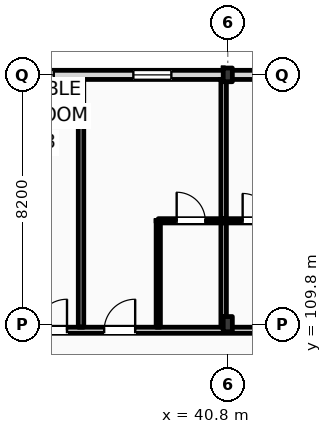
"""IFC4 building model, lengths in metres.
Left out: names, types, materials, properties, quantities, classifications, styles, units other than length and angle.
Written with IfcOpenShell. Run it as: python <this file> out.ifc"""

import sys

from ifc_helpers import new_model, si_unit, direction, frame, frame_2d, origin, origin_2d, place, context, subcontext, project, spatial, rectangle, i_section, extrude, element, fill, save


model = new_model("IFC4")
c1 = context("Model", 3, precision=1e-05, world=origin(), true_north=direction((0.0, 1.0)))
c2 = subcontext(c1, "Body", "Model", "MODEL_VIEW")
j1 = project(units=[si_unit("LENGTHUNIT", "METRE"), si_unit("PLANEANGLEUNIT", "RADIAN")], contexts=[c1])
p1 = place(None, origin())
s1 = spatial("IfcSite", under=j1, at=p1, CompositionType="ELEMENT")
p2 = place(p1, origin())
s2 = spatial("IfcBuilding", under=s1, at=p2, CompositionType="ELEMENT")
p3 = place(p2, frame((0.0, 0.0, 28.2)))
s3 = spatial("IfcBuildingStorey", under=s2, at=p3, CompositionType="ELEMENT", Elevation=28.2)
p4 = place(p3, frame((40.8, 109.8, 0.0), z_axis=(0.0, 0.0, 1.0), x_axis=(1.0, 0.0, 0.0)))
e1 = element("IfcColumn", 1, at=p4, inside=s3, PredefinedType="COLUMN", context=c2, shape_type="SweptSolid", body=[
    extrude(i_section(OverallWidth=0.3, OverallDepth=0.5, WebThickness=0.014, FlangeThickness=0.028, FilletRadius=0.027, at=origin_2d()), origin(), (0.0, 0.0, 1.0), 3.6),
])
p5 = place(p3, frame((40.8, 118.0, 0.0), z_axis=(0.0, 0.0, 1.0), x_axis=(1.0, 0.0, 0.0)))
e2 = element("IfcColumn", 2, at=p5, inside=s3, PredefinedType="COLUMN", context=c2, shape_type="SweptSolid", body=[
    extrude(i_section(OverallWidth=0.3, OverallDepth=0.45, WebThickness=0.014, FlangeThickness=0.026, FilletRadius=0.027, at=origin_2d()), origin(), (0.0, 0.0, 1.0), 3.6),
])
p6 = place(p3, frame((22.5, 118.0, 0.0), z_axis=(0.0, 0.0, 1.0), x_axis=(1.0, 0.0, 0.0)))
e3 = element("IfcWall", 3, at=p6, inside=s3, PredefinedType="STANDARD", context=c2, shape_type="SweptSolid", body=[
    extrude(rectangle(XDim=97.5, YDim=0.3, at=frame_2d((48.75, 0.0))), origin(), (0.0, 0.0, 1.0), 2.8),
])
p7 = place(p6, frame((0.91, 0.0, 0.9)))
e4 = element("IfcOpeningElement", 4, at=p7, cuts=e3, PredefinedType="OPENING", context=c2, shape_type="SweptSolid", body=[
    extrude(rectangle(XDim=0.9, YDim=1.72, at=frame_2d((0.45, 0.86))), frame((0.0, 0.16, 0.0), z_axis=(0.0, -1.0, 0.0), x_axis=(1.0, 0.0, 0.0)), (0.0, 0.0, 1.0), 0.32),
])
p8 = place(p6, frame((6.561, 0.0, 0.0)))
e5 = element("IfcOpeningElement", 5, at=p8, cuts=e3, PredefinedType="OPENING", context=c2, shape_type="SweptSolid", body=[
    extrude(rectangle(XDim=1.2, YDim=2.25, at=frame_2d((0.6, 1.125))), frame((0.0, 0.16, 0.0), z_axis=(0.0, -1.0, 0.0), x_axis=(1.0, 0.0, 0.0)), (0.0, 0.0, 1.0), 0.32),
])
p9 = place(p6, frame((11.477, 0.0, 0.9)))
e6 = element("IfcOpeningElement", 6, at=p9, cuts=e3, PredefinedType="OPENING", context=c2, shape_type="SweptSolid", body=[
    extrude(rectangle(XDim=1.1, YDim=1.5, at=frame_2d((0.55, 0.75))), frame((0.0, 0.16, 0.0), z_axis=(0.0, -1.0, 0.0), x_axis=(1.0, 0.0, 0.0)), (0.0, 0.0, 1.0), 0.32),
])
p10 = place(p6, frame((15.194, 0.0, 0.9)))
e7 = element("IfcOpeningElement", 7, at=p10, cuts=e3, PredefinedType="OPENING", context=c2, shape_type="SweptSolid", body=[
    extrude(rectangle(XDim=1.25, YDim=1.6, at=frame_2d((0.625, 0.8))), frame((0.0, 0.16, 0.0), z_axis=(0.0, -1.0, 0.0), x_axis=(1.0, 0.0, 0.0)), (0.0, 0.0, 1.0), 0.32),
])
p11 = place(p6, frame((19.509, 0.0, 0.9)))
e8 = element("IfcOpeningElement", 8, at=p11, cuts=e3, PredefinedType="OPENING", context=c2, shape_type="SweptSolid", body=[
    extrude(rectangle(XDim=1.4, YDim=1.7, at=frame_2d((0.7, 0.85))), frame((0.0, 0.16, 0.0), z_axis=(0.0, -1.0, 0.0), x_axis=(1.0, 0.0, 0.0)), (0.0, 0.0, 1.0), 0.32),
])
p12 = place(p6, frame((23.258, 0.0, 0.0)))
e9 = element("IfcOpeningElement", 9, at=p12, cuts=e3, PredefinedType="OPENING", context=c2, shape_type="SweptSolid", body=[
    extrude(rectangle(XDim=1.2, YDim=2.25, at=frame_2d((0.6, 1.125))), frame((0.0, 0.16, 0.0), z_axis=(0.0, -1.0, 0.0), x_axis=(1.0, 0.0, 0.0)), (0.0, 0.0, 1.0), 0.32),
])
p13 = place(p6, frame((28.115, 0.0, 0.9)))
e10 = element("IfcOpeningElement", 10, at=p13, cuts=e3, PredefinedType="OPENING", context=c2, shape_type="SweptSolid", body=[
    extrude(rectangle(XDim=1.75, YDim=1.72, at=frame_2d((0.875, 0.86))), frame((0.0, 0.16, 0.0), z_axis=(0.0, -1.0, 0.0), x_axis=(1.0, 0.0, 0.0)), (0.0, 0.0, 1.0), 0.32),
])
p14 = place(p6, frame((31.582, 0.0, 0.9)))
e11 = element("IfcOpeningElement", 11, at=p14, cuts=e3, PredefinedType="OPENING", context=c2, shape_type="SweptSolid", body=[
    extrude(rectangle(XDim=1.35, YDim=1.72, at=frame_2d((0.675, 0.86))), frame((0.0, 0.16, 0.0), z_axis=(0.0, -1.0, 0.0), x_axis=(1.0, 0.0, 0.0)), (0.0, 0.0, 1.0), 0.32),
])
p15 = place(p6, frame((37.379, 0.0, 0.0)))
e12 = element("IfcOpeningElement", 12, at=p15, cuts=e3, PredefinedType="OPENING", context=c2, shape_type="SweptSolid", body=[
    extrude(rectangle(XDim=1.2, YDim=2.25, at=frame_2d((0.6, 1.125))), frame((0.0, 0.16, 0.0), z_axis=(0.0, -1.0, 0.0), x_axis=(1.0, 0.0, 0.0)), (0.0, 0.0, 1.0), 0.32),
])
p16 = place(p6, frame((42.663, 0.0, 0.9)))
e13 = element("IfcOpeningElement", 13, at=p16, cuts=e3, PredefinedType="OPENING", context=c2, shape_type="SweptSolid", body=[
    extrude(rectangle(XDim=1.35, YDim=1.72, at=frame_2d((0.675, 0.86))), frame((0.0, 0.16, 0.0), z_axis=(0.0, -1.0, 0.0), x_axis=(1.0, 0.0, 0.0)), (0.0, 0.0, 1.0), 0.32),
])
p17 = place(p6, frame((45.119, 0.0, 0.9)))
e14 = element("IfcOpeningElement", 14, at=p17, cuts=e3, PredefinedType="OPENING", context=c2, shape_type="SweptSolid", body=[
    extrude(rectangle(XDim=2.871, YDim=1.72, at=frame_2d((1.436, 0.86))), frame((0.0, 0.16, 0.0), z_axis=(0.0, -1.0, 0.0), x_axis=(1.0, 0.0, 0.0)), (0.0, 0.0, 1.0), 0.32),
])
p18 = place(p6, frame((50.41, 0.0, 0.9)))
e15 = element("IfcOpeningElement", 15, at=p18, cuts=e3, PredefinedType="OPENING", context=c2, shape_type="SweptSolid", body=[
    extrude(rectangle(XDim=1.8, YDim=1.72, at=frame_2d((0.9, 0.86))), frame((0.0, 0.16, 0.0), z_axis=(0.0, -1.0, 0.0), x_axis=(1.0, 0.0, 0.0)), (0.0, 0.0, 1.0), 0.32),
])
p19 = place(p6, frame((54.375, 0.0, 0.0)))
e16 = element("IfcOpeningElement", 16, at=p19, cuts=e3, PredefinedType="OPENING", context=c2, shape_type="SweptSolid", body=[
    extrude(rectangle(XDim=1.2, YDim=2.25, at=frame_2d((0.6, 1.125))), frame((0.0, 0.16, 0.0), z_axis=(0.0, -1.0, 0.0), x_axis=(1.0, 0.0, 0.0)), (0.0, 0.0, 1.0), 0.32),
])
p20 = place(p6, frame((59.052, 0.0, 0.9)))
e17 = element("IfcOpeningElement", 17, at=p20, cuts=e3, PredefinedType="OPENING", context=c2, shape_type="SweptSolid", body=[
    extrude(rectangle(XDim=1.35, YDim=1.72, at=frame_2d((0.675, 0.86))), frame((0.0, 0.16, 0.0), z_axis=(0.0, -1.0, 0.0), x_axis=(1.0, 0.0, 0.0)), (0.0, 0.0, 1.0), 0.32),
])
p21 = place(p6, frame((62.768, 0.0, 0.9)))
e18 = element("IfcOpeningElement", 18, at=p21, cuts=e3, PredefinedType="OPENING", context=c2, shape_type="SweptSolid", body=[
    extrude(rectangle(XDim=1.5, YDim=1.72, at=frame_2d((0.75, 0.86))), frame((0.0, 0.16, 0.0), z_axis=(0.0, -1.0, 0.0), x_axis=(1.0, 0.0, 0.0)), (0.0, 0.0, 1.0), 0.32),
])
p22 = place(p6, frame((68.498, 0.0, 0.0)))
e19 = element("IfcOpeningElement", 19, at=p22, cuts=e3, PredefinedType="OPENING", context=c2, shape_type="SweptSolid", body=[
    extrude(rectangle(XDim=1.2, YDim=2.25, at=frame_2d((0.6, 1.125))), frame((0.0, 0.16, 0.0), z_axis=(0.0, -1.0, 0.0), x_axis=(1.0, 0.0, 0.0)), (0.0, 0.0, 1.0), 0.32),
])
p23 = place(p6, frame((71.265, 0.0, 0.9)))
e20 = element("IfcOpeningElement", 20, at=p23, cuts=e3, PredefinedType="OPENING", context=c2, shape_type="SweptSolid", body=[
    extrude(rectangle(XDim=0.9, YDim=1.72, at=frame_2d((0.45, 0.86))), frame((0.0, 0.16, 0.0), z_axis=(0.0, -1.0, 0.0), x_axis=(1.0, 0.0, 0.0)), (0.0, 0.0, 1.0), 0.32),
])
p24 = place(p6, frame((76.316, 0.0, 0.9)))
e21 = element("IfcOpeningElement", 21, at=p24, cuts=e3, PredefinedType="OPENING", context=c2, shape_type="SweptSolid", body=[
    extrude(rectangle(XDim=1.95, YDim=1.72, at=frame_2d((0.975, 0.86))), frame((0.0, 0.16, 0.0), z_axis=(0.0, -1.0, 0.0), x_axis=(1.0, 0.0, 0.0)), (0.0, 0.0, 1.0), 0.32),
])
p25 = place(p6, frame((81.632, 0.0, 0.9)))
e22 = element("IfcOpeningElement", 22, at=p25, cuts=e3, PredefinedType="OPENING", context=c2, shape_type="SweptSolid", body=[
    extrude(rectangle(XDim=1.35, YDim=1.72, at=frame_2d((0.675, 0.86))), frame((0.0, 0.16, 0.0), z_axis=(0.0, -1.0, 0.0), x_axis=(1.0, 0.0, 0.0)), (0.0, 0.0, 1.0), 0.32),
])
p26 = place(p6, frame((84.948, 0.0, 0.9)))
e23 = element("IfcOpeningElement", 23, at=p26, cuts=e3, PredefinedType="OPENING", context=c2, shape_type="SweptSolid", body=[
    extrude(rectangle(XDim=2.25, YDim=1.72, at=frame_2d((1.125, 0.86))), frame((0.0, 0.16, 0.0), z_axis=(0.0, -1.0, 0.0), x_axis=(1.0, 0.0, 0.0)), (0.0, 0.0, 1.0), 0.32),
])
p27 = place(p6, frame((90.063, 0.0, 0.9)))
e24 = element("IfcOpeningElement", 24, at=p27, cuts=e3, PredefinedType="OPENING", context=c2, shape_type="SweptSolid", body=[
    extrude(rectangle(XDim=1.8, YDim=1.72, at=frame_2d((0.9, 0.86))), frame((0.0, 0.16, 0.0), z_axis=(0.0, -1.0, 0.0), x_axis=(1.0, 0.0, 0.0)), (0.0, 0.0, 1.0), 0.32),
])
p28 = place(p6, frame((93.529, 0.0, 0.9)))
e25 = element("IfcOpeningElement", 25, at=p28, cuts=e3, PredefinedType="OPENING", context=c2, shape_type="SweptSolid", body=[
    extrude(rectangle(XDim=2.55, YDim=1.72, at=frame_2d((1.275, 0.86))), frame((0.0, 0.16, 0.0), z_axis=(0.0, -1.0, 0.0), x_axis=(1.0, 0.0, 0.0)), (0.0, 0.0, 1.0), 0.32),
])
p29 = place(p3, frame((10.65, 109.6, 0.0), z_axis=(0.0, 0.0, 1.0), x_axis=(1.0, 0.0, 0.0)))
e26 = element("IfcWall", 26, at=p29, inside=s3, PredefinedType="PARTITIONING", context=c2, shape_type="SweptSolid", body=[
    extrude(rectangle(XDim=109.21, YDim=0.2, at=frame_2d((54.605, 0.0))), origin(), (0.0, 0.0, 1.0), 2.8),
])
p30 = place(p29, frame((12.611, 0.0, 0.0)))
e27 = element("IfcOpeningElement", 27, at=p30, cuts=e26, PredefinedType="OPENING", context=c2, shape_type="SweptSolid", body=[
    extrude(rectangle(XDim=1.02, YDim=2.2, at=frame_2d((0.51, 1.1))), frame((0.0, 0.11, 0.0), z_axis=(0.0, -1.0, 0.0), x_axis=(1.0, 0.0, 0.0)), (0.0, 0.0, 1.0), 0.22),
])
p31 = place(p29, frame((19.451, 0.0, 0.0)))
e28 = element("IfcOpeningElement", 28, at=p31, cuts=e26, PredefinedType="OPENING", context=c2, shape_type="SweptSolid", body=[
    extrude(rectangle(XDim=1.02, YDim=2.2, at=frame_2d((0.51, 1.1))), frame((0.0, 0.11, 0.0), z_axis=(0.0, -1.0, 0.0), x_axis=(1.0, 0.0, 0.0)), (0.0, 0.0, 1.0), 0.22),
])
p32 = place(p29, frame((23.842, 0.0, 0.0)))
e29 = element("IfcOpeningElement", 29, at=p32, cuts=e26, PredefinedType="OPENING", context=c2, shape_type="SweptSolid", body=[
    extrude(rectangle(XDim=1.02, YDim=2.2, at=frame_2d((0.51, 1.1))), frame((0.0, 0.11, 0.0), z_axis=(0.0, -1.0, 0.0), x_axis=(1.0, 0.0, 0.0)), (0.0, 0.0, 1.0), 0.22),
])
p33 = place(p29, frame((26.084, 0.0, 0.0)))
e30 = element("IfcOpeningElement", 30, at=p33, cuts=e26, PredefinedType="OPENING", context=c2, shape_type="SweptSolid", body=[
    extrude(rectangle(XDim=1.02, YDim=2.2, at=frame_2d((0.51, 1.1))), frame((0.0, 0.11, 0.0), z_axis=(0.0, -1.0, 0.0), x_axis=(1.0, 0.0, 0.0)), (0.0, 0.0, 1.0), 0.22),
])
p34 = place(p29, frame((32.655, 0.0, 0.0)))
e31 = element("IfcOpeningElement", 31, at=p34, cuts=e26, PredefinedType="OPENING", context=c2, shape_type="SweptSolid", body=[
    extrude(rectangle(XDim=0.96, YDim=2.2, at=frame_2d((0.48, 1.1))), frame((0.0, 0.11, 0.0), z_axis=(0.0, -1.0, 0.0), x_axis=(1.0, 0.0, 0.0)), (0.0, 0.0, 1.0), 0.22),
])
p35 = place(p29, frame((34.895, 0.0, 0.0)))
e32 = element("IfcOpeningElement", 32, at=p35, cuts=e26, PredefinedType="OPENING", context=c2, shape_type="SweptSolid", body=[
    extrude(rectangle(XDim=0.96, YDim=2.2, at=frame_2d((0.48, 1.1))), frame((0.0, 0.11, 0.0), z_axis=(0.0, -1.0, 0.0), x_axis=(1.0, 0.0, 0.0)), (0.0, 0.0, 1.0), 0.22),
])
p36 = place(p29, frame((41.436, 0.0, 0.0)))
e33 = element("IfcOpeningElement", 33, at=p36, cuts=e26, PredefinedType="OPENING", context=c2, shape_type="SweptSolid", body=[
    extrude(rectangle(XDim=0.96, YDim=2.2, at=frame_2d((0.48, 1.1))), frame((0.0, 0.11, 0.0), z_axis=(0.0, -1.0, 0.0), x_axis=(1.0, 0.0, 0.0)), (0.0, 0.0, 1.0), 0.22),
])
p37 = place(p29, frame((43.427, 0.0, 0.0)))
e34 = element("IfcOpeningElement", 34, at=p37, cuts=e26, PredefinedType="OPENING", context=c2, shape_type="SweptSolid", body=[
    extrude(rectangle(XDim=0.96, YDim=2.2, at=frame_2d((0.48, 1.1))), frame((0.0, 0.11, 0.0), z_axis=(0.0, -1.0, 0.0), x_axis=(1.0, 0.0, 0.0)), (0.0, 0.0, 1.0), 0.22),
])
p38 = place(p29, frame((50.218, 0.0, 0.0)))
e35 = element("IfcOpeningElement", 35, at=p38, cuts=e26, PredefinedType="OPENING", context=c2, shape_type="SweptSolid", body=[
    extrude(rectangle(XDim=0.96, YDim=2.2, at=frame_2d((0.48, 1.1))), frame((0.0, 0.11, 0.0), z_axis=(0.0, -1.0, 0.0), x_axis=(1.0, 0.0, 0.0)), (0.0, 0.0, 1.0), 0.22),
])
p39 = place(p29, frame((54.859, 0.0, 0.0)))
e36 = element("IfcOpeningElement", 36, at=p39, cuts=e26, PredefinedType="OPENING", context=c2, shape_type="SweptSolid", body=[
    extrude(rectangle(XDim=0.96, YDim=2.2, at=frame_2d((0.48, 1.1))), frame((0.0, 0.11, 0.0), z_axis=(0.0, -1.0, 0.0), x_axis=(1.0, 0.0, 0.0)), (0.0, 0.0, 1.0), 0.22),
])
p40 = place(p29, frame((59.0, 0.0, 0.0)))
e37 = element("IfcOpeningElement", 37, at=p40, cuts=e26, PredefinedType="OPENING", context=c2, shape_type="SweptSolid", body=[
    extrude(rectangle(XDim=0.96, YDim=2.2, at=frame_2d((0.48, 1.1))), frame((0.0, 0.11, 0.0), z_axis=(0.0, -1.0, 0.0), x_axis=(1.0, 0.0, 0.0)), (0.0, 0.0, 1.0), 0.22),
])
p41 = place(p29, frame((63.39, 0.0, 0.0)))
e38 = element("IfcOpeningElement", 38, at=p41, cuts=e26, PredefinedType="OPENING", context=c2, shape_type="SweptSolid", body=[
    extrude(rectangle(XDim=0.96, YDim=2.2, at=frame_2d((0.48, 1.1))), frame((0.0, 0.11, 0.0), z_axis=(0.0, -1.0, 0.0), x_axis=(1.0, 0.0, 0.0)), (0.0, 0.0, 1.0), 0.22),
])
p42 = place(p29, frame((65.631, 0.0, 0.0)))
e39 = element("IfcOpeningElement", 39, at=p42, cuts=e26, PredefinedType="OPENING", context=c2, shape_type="SweptSolid", body=[
    extrude(rectangle(XDim=0.96, YDim=2.2, at=frame_2d((0.48, 1.1))), frame((0.0, 0.11, 0.0), z_axis=(0.0, -1.0, 0.0), x_axis=(1.0, 0.0, 0.0)), (0.0, 0.0, 1.0), 0.22),
])
p43 = place(p29, frame((72.172, 0.0, 0.0)))
e40 = element("IfcOpeningElement", 40, at=p43, cuts=e26, PredefinedType="OPENING", context=c2, shape_type="SweptSolid", body=[
    extrude(rectangle(XDim=0.96, YDim=2.2, at=frame_2d((0.48, 1.1))), frame((0.0, 0.11, 0.0), z_axis=(0.0, -1.0, 0.0), x_axis=(1.0, 0.0, 0.0)), (0.0, 0.0, 1.0), 0.22),
])
p44 = place(p29, frame((74.413, 0.0, 0.0)))
e41 = element("IfcOpeningElement", 41, at=p44, cuts=e26, PredefinedType="OPENING", context=c2, shape_type="SweptSolid", body=[
    extrude(rectangle(XDim=0.96, YDim=2.2, at=frame_2d((0.48, 1.1))), frame((0.0, 0.11, 0.0), z_axis=(0.0, -1.0, 0.0), x_axis=(1.0, 0.0, 0.0)), (0.0, 0.0, 1.0), 0.22),
])
p45 = place(p29, frame((80.954, 0.0, 0.0)))
e42 = element("IfcOpeningElement", 42, at=p45, cuts=e26, PredefinedType="OPENING", context=c2, shape_type="SweptSolid", body=[
    extrude(rectangle(XDim=0.96, YDim=2.2, at=frame_2d((0.48, 1.1))), frame((0.0, 0.11, 0.0), z_axis=(0.0, -1.0, 0.0), x_axis=(1.0, 0.0, 0.0)), (0.0, 0.0, 1.0), 0.22),
])
p46 = place(p29, frame((83.195, 0.0, 0.0)))
e43 = element("IfcOpeningElement", 43, at=p46, cuts=e26, PredefinedType="OPENING", context=c2, shape_type="SweptSolid", body=[
    extrude(rectangle(XDim=0.96, YDim=2.2, at=frame_2d((0.48, 1.1))), frame((0.0, 0.11, 0.0), z_axis=(0.0, -1.0, 0.0), x_axis=(1.0, 0.0, 0.0)), (0.0, 0.0, 1.0), 0.22),
])
p47 = place(p29, frame((89.735, 0.0, 0.0)))
e44 = element("IfcOpeningElement", 44, at=p47, cuts=e26, PredefinedType="OPENING", context=c2, shape_type="SweptSolid", body=[
    extrude(rectangle(XDim=0.96, YDim=2.2, at=frame_2d((0.48, 1.1))), frame((0.0, 0.11, 0.0), z_axis=(0.0, -1.0, 0.0), x_axis=(1.0, 0.0, 0.0)), (0.0, 0.0, 1.0), 0.22),
])
p48 = place(p29, frame((94.126, 0.0, 0.0)))
e45 = element("IfcOpeningElement", 45, at=p48, cuts=e26, PredefinedType="OPENING", context=c2, shape_type="SweptSolid", body=[
    extrude(rectangle(XDim=0.96, YDim=2.2, at=frame_2d((0.48, 1.1))), frame((0.0, 0.11, 0.0), z_axis=(0.0, -1.0, 0.0), x_axis=(1.0, 0.0, 0.0)), (0.0, 0.0, 1.0), 0.22),
])
p49 = place(p29, frame((98.517, 0.0, 0.0)))
e46 = element("IfcOpeningElement", 46, at=p49, cuts=e26, PredefinedType="OPENING", context=c2, shape_type="SweptSolid", body=[
    extrude(rectangle(XDim=0.96, YDim=2.2, at=frame_2d((0.48, 1.1))), frame((0.0, 0.11, 0.0), z_axis=(0.0, -1.0, 0.0), x_axis=(1.0, 0.0, 0.0)), (0.0, 0.0, 1.0), 0.22),
])
p50 = place(p29, frame((102.908, 0.0, 0.0)))
e47 = element("IfcOpeningElement", 47, at=p50, cuts=e26, PredefinedType="OPENING", context=c2, shape_type="SweptSolid", body=[
    extrude(rectangle(XDim=0.96, YDim=2.2, at=frame_2d((0.48, 1.1))), frame((0.0, 0.11, 0.0), z_axis=(0.0, -1.0, 0.0), x_axis=(1.0, 0.0, 0.0)), (0.0, 0.0, 1.0), 0.22),
])
p51 = place(p29, frame((105.099, 0.0, 0.0)))
e48 = element("IfcOpeningElement", 48, at=p51, cuts=e26, PredefinedType="OPENING", context=c2, shape_type="SweptSolid", body=[
    extrude(rectangle(XDim=0.96, YDim=2.2, at=frame_2d((0.48, 1.1))), frame((0.0, 0.11, 0.0), z_axis=(0.0, -1.0, 0.0), x_axis=(1.0, 0.0, 0.0)), (0.0, 0.0, 1.0), 0.22),
])
p52 = place(p29, frame((2.716, 0.0, 0.0)))
e49 = element("IfcOpeningElement", 49, at=p52, cuts=e26, PredefinedType="OPENING", context=c2, shape_type="SweptSolid", body=[
    extrude(rectangle(XDim=1.35, YDim=2.25, at=frame_2d((0.675, 1.125))), frame((0.0, 0.11, 0.0), z_axis=(0.0, -1.0, 0.0), x_axis=(1.0, 0.0, 0.0)), (0.0, 0.0, 1.0), 0.22),
])
p53 = place(p29, frame((6.65, 0.0, 0.0)))
e50 = element("IfcOpeningElement", 50, at=p53, cuts=e26, PredefinedType="OPENING", context=c2, shape_type="SweptSolid", body=[
    extrude(rectangle(XDim=1.35, YDim=2.25, at=frame_2d((0.675, 1.125))), frame((0.0, 0.11, 0.0), z_axis=(0.0, -1.0, 0.0), x_axis=(1.0, 0.0, 0.0)), (0.0, 0.0, 1.0), 0.22),
])
p54 = place(p29, frame((10.583, 0.0, 0.0)))
e51 = element("IfcOpeningElement", 51, at=p54, cuts=e26, PredefinedType="OPENING", context=c2, shape_type="SweptSolid", body=[
    extrude(rectangle(XDim=1.35, YDim=2.25, at=frame_2d((0.675, 1.125))), frame((0.0, 0.11, 0.0), z_axis=(0.0, -1.0, 0.0), x_axis=(1.0, 0.0, 0.0)), (0.0, 0.0, 1.0), 0.22),
])
p55 = place(p3, frame((35.973, 109.7, 0.0), z_axis=(0.0, 0.0, 1.0), x_axis=(0.0, 1.0, 0.0)))
e52 = element("IfcWall", 52, at=p55, inside=s3, PredefinedType="PARTITIONING", context=c2, shape_type="SweptSolid", body=[
    extrude(rectangle(XDim=8.15, YDim=0.18, at=frame_2d((4.075, 0.0))), origin(), (0.0, 0.0, 1.0), 3.36),
])
p56 = place(p3, frame((40.664, 109.7, 0.0), z_axis=(0.0, 0.0, 1.0), x_axis=(0.0, 1.0, 0.0)))
e53 = element("IfcWall", 53, at=p56, inside=s3, PredefinedType="PARTITIONING", context=c2, shape_type="SweptSolid", body=[
    extrude(rectangle(XDim=8.15, YDim=0.18, at=frame_2d((4.075, 0.0))), origin(), (0.0, 0.0, 1.0), 2.99),
])
p57 = place(p3, frame((38.514, 109.7, 0.0), z_axis=(0.0, 0.0, 1.0), x_axis=(0.0, 1.0, 0.0)))
e54 = element("IfcWall", 54, at=p57, inside=s3, PredefinedType="PARTITIONING", context=c2, shape_type="SweptSolid", body=[
    extrude(rectangle(XDim=3.5, YDim=0.14, at=frame_2d((1.75, 0.0))), origin(), (0.0, 0.0, 1.0), 3.36),
])
p58 = place(p3, frame((38.514, 113.2, 0.0), z_axis=(0.0, 0.0, 1.0), x_axis=(1.0, 0.0, 0.0)))
e55 = element("IfcWall", 55, at=p58, inside=s3, PredefinedType="PARTITIONING", context=c2, shape_type="SweptSolid", body=[
    extrude(rectangle(XDim=2.15, YDim=0.14, at=frame_2d((1.075, 0.0))), origin(), (0.0, 0.0, 1.0), 3.36),
])
p59 = place(p58, frame((0.605, 0.0, 0.0)))
e56 = element("IfcOpeningElement", 56, at=p59, cuts=e55, PredefinedType="OPENING", context=c2, shape_type="SweptSolid", body=[
    extrude(rectangle(XDim=0.94, YDim=2.15, at=frame_2d((0.47, 1.075))), frame((0.0, 0.08, 0.0), z_axis=(0.0, -1.0, 0.0), x_axis=(1.0, 0.0, 0.0)), (0.0, 0.0, 1.0), 0.16),
])
p60 = place(p3, frame((40.664, 113.2, 0.0), z_axis=(0.0, 0.0, 1.0), x_axis=(1.0, 0.0, 0.0)))
e57 = element("IfcWall", 57, at=p60, inside=s3, PredefinedType="PARTITIONING", context=c2, shape_type="SweptSolid", body=[
    extrude(rectangle(XDim=2.15, YDim=0.14, at=frame_2d((1.075, 0.0))), origin(), (0.0, 0.0, 1.0), 3.36),
])
p61 = place(p60, frame((0.625, 0.0, 0.0)))
e58 = element("IfcOpeningElement", 58, at=p61, cuts=e57, PredefinedType="OPENING", context=c2, shape_type="SweptSolid", body=[
    extrude(rectangle(XDim=0.9, YDim=2.1, at=frame_2d((0.45, 1.05))), frame((0.0, 0.08, 0.0), z_axis=(0.0, -1.0, 0.0), x_axis=(1.0, 0.0, 0.0)), (0.0, 0.0, 1.0), 0.16),
])
p62 = place(p9, origin())
e59 = element("IfcWindow", 59, at=p62, inside=s3, PartitioningType="DOUBLE_PANEL_VERTICAL", PredefinedType="WINDOW", context=c2, shape_type="SweptSolid", body=[
    extrude(rectangle(XDim=1.1, YDim=1.5, at=frame_2d((0.55, 0.75))), frame((0.0, 0.03, 0.0), z_axis=(0.0, -1.0, 0.0), x_axis=(1.0, 0.0, 0.0)), (0.0, 0.0, 1.0), 0.06),
])
fill(e6, e59)
p63 = place(p10, origin())
e60 = element("IfcWindow", 60, at=p63, inside=s3, PartitioningType="DOUBLE_PANEL_VERTICAL", PredefinedType="WINDOW", context=c2, shape_type="SweptSolid", body=[
    extrude(rectangle(XDim=1.25, YDim=1.6, at=frame_2d((0.625, 0.8))), frame((0.0, 0.03, 0.0), z_axis=(0.0, -1.0, 0.0), x_axis=(1.0, 0.0, 0.0)), (0.0, 0.0, 1.0), 0.06),
])
fill(e7, e60)
p64 = place(p32, origin())
e61 = element("IfcDoor", 61, at=p64, inside=s3, OperationType="SINGLE_SWING_RIGHT", PredefinedType="DOOR", context=c2, shape_type="SweptSolid", body=[
    extrude(rectangle(XDim=1.02, YDim=2.2, at=frame_2d((0.51, 1.1))), frame((0.0, 0.025, 0.0), z_axis=(0.0, -1.0, 0.0), x_axis=(1.0, 0.0, 0.0)), (0.0, 0.0, 1.0), 0.05),
])
fill(e29, e61)
p65 = place(p33, origin())
e62 = element("IfcDoor", 62, at=p65, inside=s3, OperationType="SINGLE_SWING_RIGHT", PredefinedType="DOOR", context=c2, shape_type="SweptSolid", body=[
    extrude(rectangle(XDim=1.02, YDim=2.2, at=frame_2d((0.51, 1.1))), frame((0.0, 0.025, 0.0), z_axis=(0.0, -1.0, 0.0), x_axis=(1.0, 0.0, 0.0)), (0.0, 0.0, 1.0), 0.05),
])
fill(e30, e62)
p66 = place(p59, origin())
e63 = element("IfcDoor", 63, at=p66, inside=s3, OperationType="SINGLE_SWING_LEFT", PredefinedType="DOOR", context=c2, shape_type="SweptSolid", body=[
    extrude(rectangle(XDim=0.94, YDim=2.15, at=frame_2d((0.47, 1.075))), frame((0.0, 0.025, 0.0), z_axis=(0.0, -1.0, 0.0), x_axis=(1.0, 0.0, 0.0)), (0.0, 0.0, 1.0), 0.05),
])
fill(e56, e63)
p67 = place(p61, origin())
e64 = element("IfcDoor", 64, at=p67, inside=s3, OperationType="SINGLE_SWING_LEFT", PredefinedType="DOOR", context=c2, shape_type="SweptSolid", body=[
    extrude(rectangle(XDim=0.9, YDim=2.1, at=frame_2d((0.45, 1.05))), frame((0.0, 0.025, 0.0), z_axis=(0.0, -1.0, 0.0), x_axis=(1.0, 0.0, 0.0)), (0.0, 0.0, 1.0), 0.05),
])
fill(e58, e64)
save(model, sys.argv[1])
